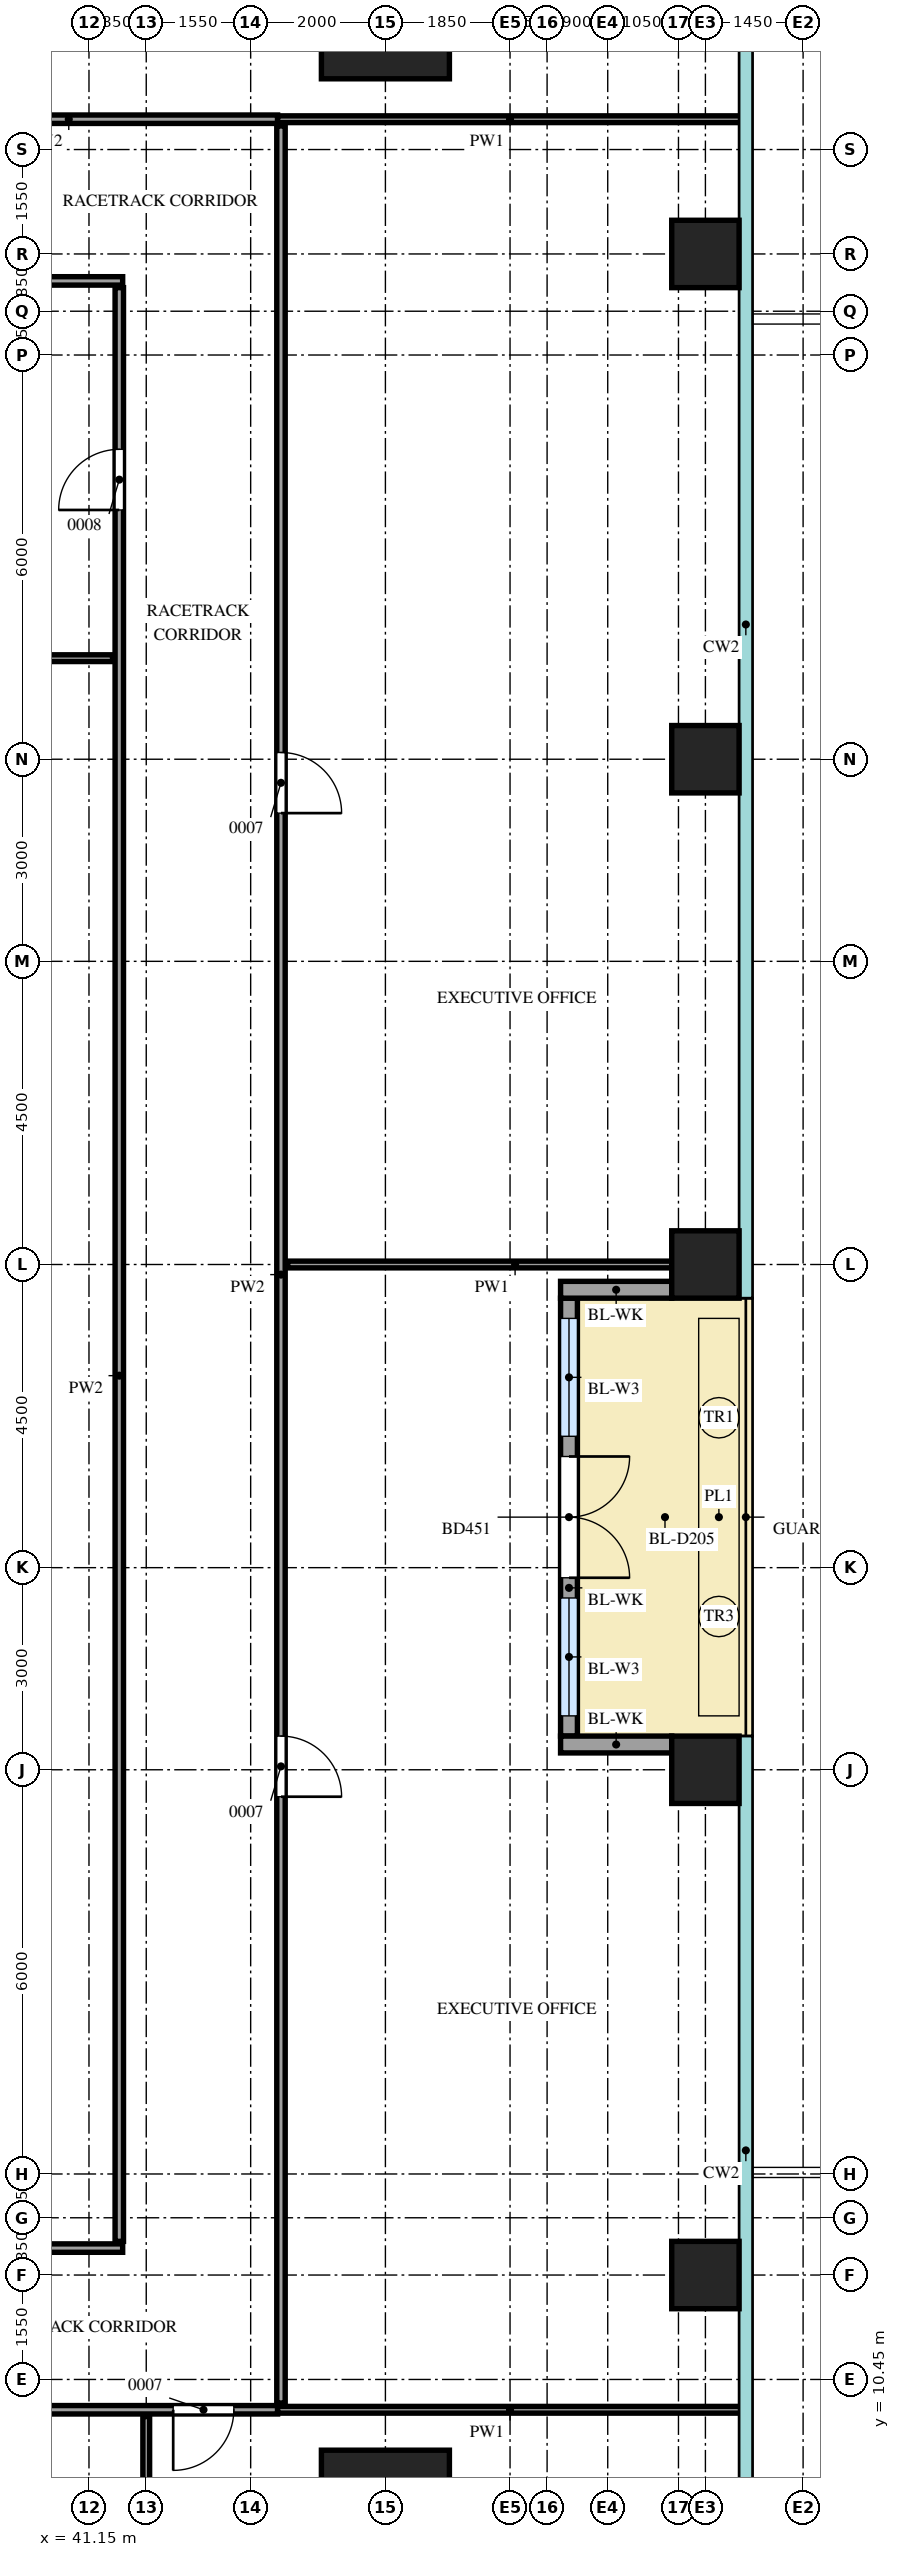
"""IFC4 building model, lengths in metres.
Left out: names, types, materials, properties, quantities, classifications, styles, units other than length and angle.
Written with IfcOpenShell. Run it as: python <this file> out.ifc"""

import sys

from ifc_helpers import new_model, si_unit, direction, frame, frame_2d, origin, origin_2d, place, context, subcontext, project, spatial, rectangle, extrude, source, transform, mapped, element, fill, save


model = new_model("IFC4")
c1 = context("Model", 3, precision=1e-05, world=origin(), true_north=direction((0.0, 1.0)))
c2 = subcontext(c1, "Body", "Model", "MODEL_VIEW")
j1 = project(units=[si_unit("LENGTHUNIT", "METRE"), si_unit("PLANEANGLEUNIT", "RADIAN")], contexts=[c1])
p1 = place(None, origin())
s1 = spatial("IfcSite", under=j1, at=p1, CompositionType="ELEMENT")
p2 = place(p1, origin())
s2 = spatial("IfcBuilding", under=s1, at=p2, CompositionType="ELEMENT")
p3 = place(p2, frame((0.0, 0.0, 204.7)))
s3 = spatial("IfcBuildingStorey", under=s2, at=p3, CompositionType="ELEMENT", Elevation=204.7)
m1 = source(origin(), c2, "Body", "SweptSolid", [
    extrude(rectangle(XDim=1.9, YDim=1.9, at=origin_2d()), origin(), (0.0, 0.0, 1.0), 4.0),
])
for number, where, z_axis, x_axis in (
    (1, (45.55, 45.55, 0.0), (0.0, 0.0, 1.0), (1.0, 0.0, 0.0)),
    (2, (45.55, 8.45, 0.0), (0.0, 0.0, 1.0), (1.0, 0.0, 0.0)),
):
    element("IfcColumn", number, at=place(p3, frame(where, z_axis=z_axis, x_axis=x_axis)), inside=s3, PredefinedType="COLUMN", context=c2, shape_type="MappedRepresentation", body=[
        mapped(m1, transform((0.0, 0.0, 0.0))),
    ])
m2 = source(origin(), c2, "Body", "SweptSolid", [
    extrude(rectangle(XDim=1.0, YDim=1.0, at=origin_2d()), origin(), (0.0, 0.0, 1.0), 3.75),
])
for number, where, z_axis, x_axis in (
    (3, (50.3, 12.0, 0.0), (0.0, 0.0, 1.0), (1.0, 0.0, 0.0)),
    (4, (50.3, 19.5, 0.0), (0.0, 0.0, 1.0), (1.0, 0.0, 0.0)),
    (5, (50.3, 27.0, 0.0), (0.0, 0.0, 1.0), (1.0, 0.0, 0.0)),
    (6, (50.3, 34.5, 0.0), (0.0, 0.0, 1.0), (1.0, 0.0, 0.0)),
    (7, (50.3, 42.0, 0.0), (0.0, 0.0, 1.0), (1.0, 0.0, 0.0)),
):
    element("IfcColumn", number, at=place(p3, frame(where, z_axis=z_axis, x_axis=x_axis)), inside=s3, PredefinedType="COLUMN", context=c2, shape_type="MappedRepresentation", body=[
        mapped(m2, transform((0.0, 0.0, 0.0))),
    ])
m3 = source(origin(), c2, "Body", "SweptSolid", [
    extrude(rectangle(XDim=6.5, YDim=0.25, at=frame_2d((3.25, 0.0))), origin(), (0.0, 0.0, 1.0), 3.15),
])
p4 = place(p3, frame((48.275, 20.0, 0.0), z_axis=(0.0, 0.0, 1.0), x_axis=(0.0, 1.0, 0.0)))
e8 = element("IfcWall", 8, at=p4, inside=s3, PredefinedType="SOLIDWALL", context=c2, shape_type="MappedRepresentation", body=[
    mapped(m3, transform((0.0, 0.0, 0.0))),
])
m4 = source(origin(), c2, "Body", "SweptSolid", [
    extrude(rectangle(XDim=1.75, YDim=2.4, at=frame_2d((0.875, 1.2))), frame((0.0, 0.135, 0.0), z_axis=(0.0, -1.0, 0.0), x_axis=(1.0, 0.0, 0.0)), (0.0, 0.0, 1.0), 0.27),
])
p5 = place(p4, frame((0.3, 0.0, 0.0)))
e9 = element("IfcOpeningElement", 9, at=p5, cuts=e8, PredefinedType="OPENING", context=c2, shape_type="MappedRepresentation", body=[
    mapped(m4, transform((0.0, 0.0, 0.0))),
])
p6 = place(p4, frame((4.45, 0.0, 0.0)))
e10 = element("IfcOpeningElement", 10, at=p6, cuts=e8, PredefinedType="OPENING", context=c2, shape_type="MappedRepresentation", body=[
    mapped(m4, transform((0.0, 0.0, 0.0))),
])
m5 = source(origin(), c2, "Body", "SweptSolid", [
    extrude(rectangle(XDim=1.8, YDim=2.4, at=frame_2d((0.9, 1.2))), frame((0.0, 0.135, 0.0), z_axis=(0.0, -1.0, 0.0), x_axis=(1.0, 0.0, 0.0)), (0.0, 0.0, 1.0), 0.27),
])
p7 = place(p4, frame((2.35, 0.0, 0.0)))
e11 = element("IfcOpeningElement", 11, at=p7, cuts=e8, PredefinedType="OPENING", context=c2, shape_type="MappedRepresentation", body=[
    mapped(m5, transform((0.0, 0.0, 0.0))),
])
m6 = source(origin(), c2, "Body", "SweptSolid", [
    extrude(rectangle(XDim=1.65, YDim=0.25, at=frame_2d((0.825, 0.0))), origin(), (0.0, 0.0, 1.0), 3.15),
])
for number, where, z_axis, x_axis in (
    (12, (49.8, 19.875, 0.0), (0.0, 0.0, 1.0), (-1.0, 0.0, 0.0)),
    (13, (49.8, 26.625, 0.0), (0.0, 0.0, 1.0), (-1.0, 0.0, 0.0)),
):
    element("IfcWall", number, at=place(p3, frame(where, z_axis=z_axis, x_axis=x_axis)), inside=s3, PredefinedType="SOLIDWALL", context=c2, shape_type="MappedRepresentation", body=[
        mapped(m6, transform((0.0, 0.0, 0.0))),
    ])
m7 = source(origin(), c2, "Body", "SweptSolid", [
    extrude(rectangle(XDim=6.75, YDim=0.1, at=frame_2d((3.375, 0.0))), origin(), (0.0, 0.0, 1.0), 3.3),
])
p8 = place(p3, frame((42.0, 3.15, 0.0), z_axis=(0.0, 0.0, 1.0), x_axis=(0.0, 1.0, 0.0)))
e14 = element("IfcWall", 14, at=p8, inside=s3, PredefinedType="PARTITIONING", context=c2, shape_type="MappedRepresentation", body=[
    mapped(m7, transform((0.0, 0.0, 0.0))),
])
m8 = source(origin(), c2, "Body", "SweptSolid", [
    extrude(rectangle(XDim=20.6, YDim=0.125, at=frame_2d((10.3, 0.0))), origin(), (0.0, 0.0, 1.0), 3.8),
])
p9 = place(p3, frame((23.35, 10.0, 0.0), z_axis=(0.0, 0.0, 1.0), x_axis=(1.0, 0.0, 0.0)))
e15 = element("IfcWall", 15, at=p9, inside=s3, PredefinedType="PARTITIONING", context=c2, shape_type="MappedRepresentation", body=[
    mapped(m8, transform((0.0, 0.0, 0.0))),
])
m9 = source(origin(), c2, "Body", "SweptSolid", [
    extrude(rectangle(XDim=0.9, YDim=2.1, at=frame_2d((0.45, 1.05))), frame((0.0, 0.073, 0.0), z_axis=(0.0, -1.0, 0.0), x_axis=(1.0, 0.0, 0.0)), (0.0, 0.0, 1.0), 0.145),
])
p10 = place(p9, frame((1.25, 0.0, 0.0)))
e16 = element("IfcOpeningElement", 16, at=p10, cuts=e15, PredefinedType="OPENING", context=c2, shape_type="MappedRepresentation", body=[
    mapped(m9, transform((0.0, 0.0, 0.0))),
])
p11 = place(p9, frame((10.55, 0.0, 0.0)))
e17 = element("IfcOpeningElement", 17, at=p11, cuts=e15, PredefinedType="OPENING", context=c2, shape_type="MappedRepresentation", body=[
    mapped(m9, transform((0.0, 0.0, 0.0))),
])
p12 = place(p9, frame((19.05, 0.0, 0.0)))
e18 = element("IfcOpeningElement", 18, at=p12, cuts=e15, PredefinedType="OPENING", context=c2, shape_type="MappedRepresentation", body=[
    mapped(m9, transform((0.0, 0.0, 0.0))),
])
m10 = source(origin(), c2, "Body", "SweptSolid", [
    extrude(rectangle(XDim=6.9, YDim=0.1, at=frame_2d((3.45, 0.0))), origin(), (0.0, 0.0, 1.0), 3.8),
])
p13 = place(p3, frame((43.95, 10.0, 0.0), z_axis=(0.0, 0.0, 1.0), x_axis=(1.0, 0.0, 0.0)))
e19 = element("IfcWall", 19, at=p13, inside=s3, PredefinedType="PARTITIONING", context=c2, shape_type="MappedRepresentation", body=[
    mapped(m10, transform((0.0, 0.0, 0.0))),
])
m11 = source(origin(), c2, "Body", "SweptSolid", [
    extrude(rectangle(XDim=33.8, YDim=0.125, at=frame_2d((16.9, 0.0))), origin(), (0.0, 0.0, 1.0), 3.8),
])
p14 = place(p3, frame((44.0, 10.1, 0.0), z_axis=(0.0, 0.0, 1.0), x_axis=(0.0, 1.0, 0.0)))
e20 = element("IfcWall", 20, at=p14, inside=s3, PredefinedType="PARTITIONING", context=c2, shape_type="MappedRepresentation", body=[
    mapped(m11, transform((0.0, 0.0, 0.0))),
])
p15 = place(p14, frame((9.0, 0.0, 0.0)))
e21 = element("IfcOpeningElement", 21, at=p15, cuts=e20, PredefinedType="OPENING", context=c2, shape_type="MappedRepresentation", body=[
    mapped(m9, transform((0.0, 0.0, 0.0))),
])
p16 = place(p14, frame((23.6, 0.0, 0.0)))
e22 = element("IfcOpeningElement", 22, at=p16, cuts=e20, PredefinedType="OPENING", context=c2, shape_type="MappedRepresentation", body=[
    mapped(m9, transform((0.0, 0.0, 0.0))),
])
m12 = source(origin(), c2, "Body", "SweptSolid", [
    extrude(rectangle(XDim=18.3, YDim=0.125, at=frame_2d((9.15, 0.0))), origin(), (0.0, 0.0, 1.0), 3.8),
])
p17 = place(p3, frame((23.35, 12.4, 0.0), z_axis=(0.0, 0.0, 1.0), x_axis=(1.0, 0.0, 0.0)))
e23 = element("IfcWall", 23, at=p17, inside=s3, PredefinedType="PARTITIONING", context=c2, shape_type="MappedRepresentation", body=[
    mapped(m12, transform((0.0, 0.0, 0.0))),
])
m13 = source(origin(), c2, "Body", "SweptSolid", [
    extrude(rectangle(XDim=29.0, YDim=0.125, at=frame_2d((14.5, 0.0))), origin(), (0.0, 0.0, 1.0), 3.8),
])
p18 = place(p3, frame((41.6, 12.5, 0.0), z_axis=(0.0, 0.0, 1.0), x_axis=(0.0, 1.0, 0.0)))
e24 = element("IfcWall", 24, at=p18, inside=s3, PredefinedType="PARTITIONING", context=c2, shape_type="MappedRepresentation", body=[
    mapped(m13, transform((0.0, 0.0, 0.0))),
])
p19 = place(p18, frame((25.7, 0.0, 0.0)))
e25 = element("IfcOpeningElement", 25, at=p19, cuts=e24, PredefinedType="OPENING", context=c2, shape_type="MappedRepresentation", body=[
    mapped(m9, transform((0.0, 0.0, 0.0))),
])
m14 = source(origin(), c2, "Body", "SweptSolid", [
    extrude(rectangle(XDim=6.75, YDim=0.1, at=frame_2d((3.375, 0.0))), origin(), (0.0, 0.0, 1.0), 3.8),
])
p20 = place(p3, frame((44.1, 27.0, 0.0), z_axis=(0.0, 0.0, 1.0), x_axis=(1.0, 0.0, 0.0)))
e26 = element("IfcWall", 26, at=p20, inside=s3, PredefinedType="PARTITIONING", context=c2, shape_type="MappedRepresentation", body=[
    mapped(m14, transform((0.0, 0.0, 0.0))),
])
m15 = source(origin(), c2, "Body", "SweptSolid", [
    extrude(rectangle(XDim=10.95, YDim=0.1, at=frame_2d((5.475, 0.0))), origin(), (0.0, 0.0, 1.0), 3.8),
])
p21 = place(p3, frame((30.55, 36.0, 0.0), z_axis=(0.0, 0.0, 1.0), x_axis=(1.0, 0.0, 0.0)))
e27 = element("IfcWall", 27, at=p21, inside=s3, PredefinedType="PARTITIONING", context=c2, shape_type="MappedRepresentation", body=[
    mapped(m15, transform((0.0, 0.0, 0.0))),
])
m16 = source(origin(), c2, "Body", "SweptSolid", [
    extrude(rectangle(XDim=11.1, YDim=0.125, at=frame_2d((5.55, 0.0))), origin(), (0.0, 0.0, 1.0), 3.8),
])
p22 = place(p3, frame((30.55, 41.6, 0.0), z_axis=(0.0, 0.0, 1.0), x_axis=(1.0, 0.0, 0.0)))
e28 = element("IfcWall", 28, at=p22, inside=s3, PredefinedType="PARTITIONING", context=c2, shape_type="MappedRepresentation", body=[
    mapped(m16, transform((0.0, 0.0, 0.0))),
])
m17 = source(origin(), c2, "Body", "SweptSolid", [
    extrude(rectangle(XDim=13.4, YDim=0.125, at=frame_2d((6.7, 0.0))), origin(), (0.0, 0.0, 1.0), 3.8),
])
p23 = place(p3, frame((30.55, 44.0, 0.0), z_axis=(0.0, 0.0, 1.0), x_axis=(1.0, 0.0, 0.0)))
e29 = element("IfcWall", 29, at=p23, inside=s3, PredefinedType="PARTITIONING", context=c2, shape_type="MappedRepresentation", body=[
    mapped(m17, transform((0.0, 0.0, 0.0))),
])
m18 = source(origin(), c2, "Body", "SweptSolid", [
    extrude(rectangle(XDim=1.2, YDim=2.1, at=frame_2d((0.6, 1.05))), frame((0.0, 0.073, 0.0), z_axis=(0.0, -1.0, 0.0), x_axis=(1.0, 0.0, 0.0)), (0.0, 0.0, 1.0), 0.145),
])
p24 = place(p23, frame((6.0, 0.0, 0.0)))
e30 = element("IfcOpeningElement", 30, at=p24, cuts=e29, PredefinedType="OPENING", context=c2, shape_type="MappedRepresentation", body=[
    mapped(m18, transform((0.0, 0.0, 0.0))),
])
p25 = place(p3, frame((43.95, 44.0, 0.0), z_axis=(0.0, 0.0, 1.0), x_axis=(1.0, 0.0, 0.0)))
e31 = element("IfcWall", 31, at=p25, inside=s3, PredefinedType="PARTITIONING", context=c2, shape_type="MappedRepresentation", body=[
    mapped(m10, transform((0.0, 0.0, 0.0))),
])
m19 = source(origin(), c2, "Body", "SweptSolid", [
    extrude(rectangle(XDim=1.75, YDim=2.4, at=frame_2d((0.875, 1.2))), frame((0.0, 0.03, 0.0), z_axis=(0.0, -1.0, 0.0), x_axis=(1.0, 0.0, 0.0)), (0.0, 0.0, 1.0), 0.06),
])
p26 = place(p5, origin())
e32 = element("IfcWindow", 32, at=p26, inside=s3, PartitioningType="SINGLE_PANEL", PredefinedType="WINDOW", context=c2, shape_type="MappedRepresentation", body=[
    mapped(m19, transform((0.0, 0.0, 0.0))),
])
fill(e9, e32)
p27 = place(p6, origin())
e33 = element("IfcWindow", 33, at=p27, inside=s3, PartitioningType="SINGLE_PANEL", PredefinedType="WINDOW", context=c2, shape_type="MappedRepresentation", body=[
    mapped(m19, transform((0.0, 0.0, 0.0))),
])
fill(e10, e33)
m20 = source(origin(), c2, "Body", "SweptSolid", [
    extrude(rectangle(XDim=1.8, YDim=2.4, at=frame_2d((0.9, 1.2))), frame((0.0, 0.025, 0.0), z_axis=(0.0, -1.0, 0.0), x_axis=(1.0, 0.0, 0.0)), (0.0, 0.0, 1.0), 0.05),
])
p28 = place(p7, origin())
e34 = element("IfcDoor", 34, at=p28, inside=s3, OperationType="DOUBLE_DOOR_DOUBLE_SWING", PredefinedType="DOOR", context=c2, shape_type="MappedRepresentation", body=[
    mapped(m20, transform((0.0, 0.0, 0.0))),
])
fill(e11, e34)
m21 = source(origin(), c2, "Body", "SweptSolid", [
    extrude(rectangle(XDim=0.9, YDim=2.1, at=frame_2d((0.45, 1.05))), frame((0.0, 0.025, 0.0), z_axis=(0.0, -1.0, 0.0), x_axis=(1.0, 0.0, 0.0)), (0.0, 0.0, 1.0), 0.05),
])
p29 = place(p12, origin())
e35 = element("IfcDoor", 35, at=p29, inside=s3, OperationType="SINGLE_SWING_LEFT", PredefinedType="DOOR", context=c2, shape_type="MappedRepresentation", body=[
    mapped(m21, transform((0.0, 0.0, 0.0))),
])
fill(e18, e35)
p30 = place(p15, origin())
e36 = element("IfcDoor", 36, at=p30, inside=s3, OperationType="SINGLE_SWING_LEFT", PredefinedType="DOOR", context=c2, shape_type="MappedRepresentation", body=[
    mapped(m21, transform((0.0, 0.0, 0.0))),
])
fill(e21, e36)
p31 = place(p16, origin())
e37 = element("IfcDoor", 37, at=p31, inside=s3, OperationType="SINGLE_SWING_LEFT", PredefinedType="DOOR", context=c2, shape_type="MappedRepresentation", body=[
    mapped(m21, transform((0.0, 0.0, 0.0))),
])
fill(e22, e37)
p32 = place(p19, origin())
e38 = element("IfcDoor", 38, at=p32, inside=s3, OperationType="SINGLE_SWING_RIGHT", PredefinedType="DOOR", context=c2, shape_type="MappedRepresentation", body=[
    mapped(m21, transform((0.0, 0.0, 0.0))),
])
fill(e25, e38)
save(model, sys.argv[1])
